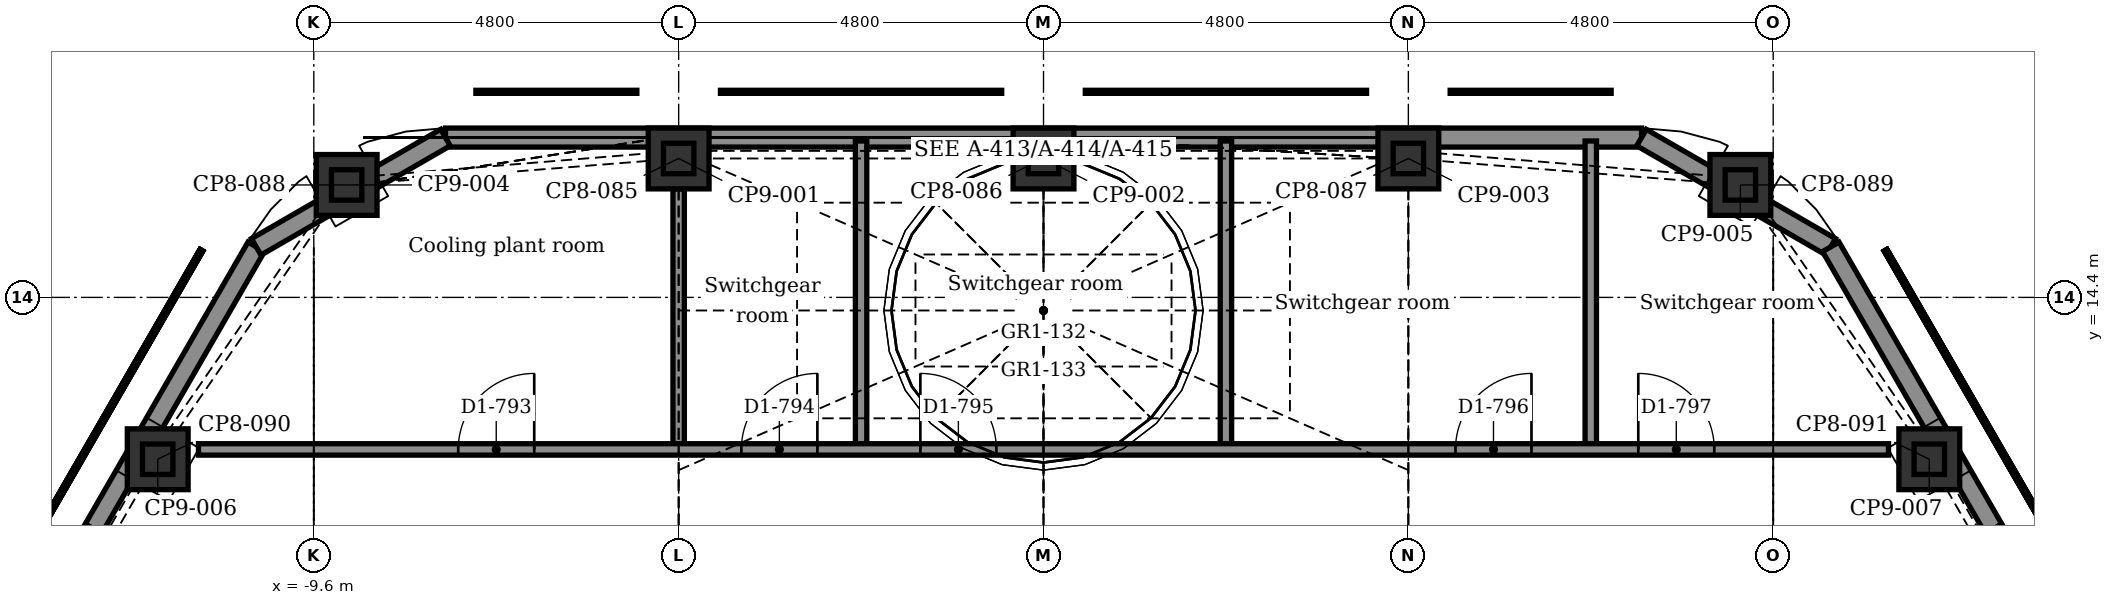
"""IFC4 building model, lengths in metres.
Left out: names, types, materials, properties, quantities, classifications, styles, units other than length and angle.
Written with IfcOpenShell. Run it as: python <this file> out.ifc"""

import sys

from ifc_helpers import new_model, si_unit, direction, frame, frame_2d, origin, origin_2d, place, context, subcontext, project, spatial, polyline, rectangle, hollow_rectangle, outline, extrude, element, fill, save


model = new_model("IFC4")
c1 = context("Model", 3, precision=1e-05, world=origin(), true_north=direction((0.0, 1.0)))
c2 = subcontext(c1, "Body", "Model", "MODEL_VIEW")
j1 = project(units=[si_unit("LENGTHUNIT", "METRE"), si_unit("PLANEANGLEUNIT", "RADIAN")], contexts=[c1])
p1 = place(None, origin())
s1 = spatial("IfcSite", under=j1, at=p1, CompositionType="ELEMENT")
p2 = place(p1, origin())
s2 = spatial("IfcBuilding", under=s1, at=p2, CompositionType="ELEMENT")
p3 = place(p2, frame((0.0, 0.0, 301.9)))
s3 = spatial("IfcBuildingStorey", under=s2, at=p3, CompositionType="ELEMENT", Elevation=301.9)
for number, where, z_axis, x_axis in (
    (1, (-9.168, 15.879, -0.3), (0.0, 0.0, 1.0), (0.866, 0.5, 0.0)),
    (2, (-4.8, 16.228, -0.3), (0.0, 0.0, 1.0), (1.0, 0.0, 0.0)),
    (3, (0.0, 16.228, -0.3), (0.0, 0.0, 1.0), (1.0, 0.0, 0.0)),
    (4, (4.8, 16.228, -0.3), (0.0, 0.0, 1.0), (1.0, 0.0, 0.0)),
    (5, (9.168, 15.879, -0.3), (0.0, 0.0, 1.0), (0.5, 0.866, 0.0)),
    (6, (11.654, 12.271, -0.3), (0.0, 0.0, 1.0), (0.866, 0.5, 0.0)),
    (7, (-11.654, 12.271, -0.3), (0.0, 0.0, 1.0), (0.5, 0.866, 0.0)),
):
    element("IfcColumn", number, at=place(p3, frame(where, z_axis=z_axis, x_axis=x_axis)), inside=s3, PredefinedType="COLUMN", context=c2, shape_type="SweptSolid", body=[
        extrude(rectangle(XDim=0.8, YDim=0.8, at=origin_2d()), origin(), (0.0, 0.0, 1.0), 5.3),
    ])
p4 = place(p3, frame((-9.168, 15.879, 5.0), z_axis=(0.0, 0.0, 1.0), x_axis=(1.0, 0.0, 0.0)))
e8 = element("IfcColumn", 8, at=p4, inside=s3, PredefinedType="COLUMN", context=c2, shape_type="SweptSolid", body=[
    extrude(hollow_rectangle(XDim=0.4, YDim=0.4, WallThickness=0.02, at=origin_2d()), origin(), (0.0, 0.0, 1.0), 19.768),
])
for number, where, z_axis, x_axis in (
    (9, (-4.8, 16.228, 5.0), (0.0, 0.0, 1.0), (1.0, 0.0, 0.0)),
    (10, (0.0, 16.228, 5.0), (0.0, 0.0, 1.0), (1.0, 0.0, 0.0)),
    (11, (4.8, 16.228, 5.0), (0.0, 0.0, 1.0), (1.0, 0.0, 0.0)),
):
    element("IfcColumn", number, at=place(p3, frame(where, z_axis=z_axis, x_axis=x_axis)), inside=s3, PredefinedType="COLUMN", context=c2, shape_type="SweptSolid", body=[
        extrude(hollow_rectangle(XDim=0.4, YDim=0.4, WallThickness=0.02, at=origin_2d()), origin(), (0.0, 0.0, 1.0), 19.986),
    ])
p5 = place(p3, frame((9.168, 15.879, 5.0), z_axis=(0.0, 0.0, 1.0), x_axis=(1.0, 0.0, 0.0)))
e12 = element("IfcColumn", 12, at=p5, inside=s3, PredefinedType="COLUMN", context=c2, shape_type="SweptSolid", body=[
    extrude(hollow_rectangle(XDim=0.4, YDim=0.4, WallThickness=0.02, at=origin_2d()), origin(), (0.0, 0.0, 1.0), 19.768),
])
for number, where, z_axis, x_axis in (
    (13, (11.654, 12.271, 5.0), (0.0, 0.0, 1.0), (1.0, 0.0, 0.0)),
    (14, (-11.654, 12.271, 5.0), (0.0, 0.0, 1.0), (1.0, 0.0, 0.0)),
):
    element("IfcColumn", number, at=place(p3, frame(where, z_axis=z_axis, x_axis=x_axis)), inside=s3, PredefinedType="COLUMN", context=c2, shape_type="SweptSolid", body=[
        extrude(hollow_rectangle(XDim=0.4, YDim=0.4, WallThickness=0.02, at=origin_2d()), origin(), (0.0, 0.0, 1.0), 17.513),
    ])
p6 = place(p3, frame((-7.868, 16.503, 0.0), z_axis=(0.0, 0.0, 1.0), x_axis=(1.0, 0.0, 0.0)))
e15 = element("IfcWall", 15, at=p6, inside=s3, PredefinedType="SOLIDWALL", context=c2, shape_type="SweptSolid", body=[
    extrude(rectangle(XDim=15.736, YDim=0.25, at=frame_2d((7.868, 0.0))), origin(), (0.0, 0.0, 1.0), 5.0),
])
p7 = place(p3, frame((7.868, 16.503, 0.0), z_axis=(0.0, 0.0, 1.0), x_axis=(0.866018712932, -0.500011588718, 0.0)))
e16 = element("IfcWall", 16, at=p7, inside=s3, PredefinedType="SOLIDWALL", context=c2, shape_type="SweptSolid", body=[
    extrude(outline(polyline([(0.0, 0.0), (2.875, 0.0), (2.875, 24.509), (0.0, 25.407), (0.0, 0.0)])), frame((0.0, 0.125, 0.0), z_axis=(0.0, -1.0, 0.0), x_axis=(1.0, 0.0, 0.0)), (0.0, 0.0, 1.0), 0.25),
])
p8 = place(p3, frame((10.358, 15.065, 0.0), z_axis=(0.0, 0.0, 1.0), x_axis=(0.500010301671, -0.86601945603, 0.0)))
e17 = element("IfcWall", 17, at=p8, inside=s3, PredefinedType="SOLIDWALL", context=c2, shape_type="SweptSolid", body=[
    extrude(outline(polyline([(0.0, 0.0), (15.736, 0.0), (15.736, 15.994), (0.0, 24.509), (0.0, 0.0)])), frame((0.0, 0.125, 0.0), z_axis=(0.0, -1.0, 0.0), x_axis=(1.0, 0.0, 0.0)), (0.0, 0.0, 1.0), 0.25),
])
p9 = place(p8, frame((4.268, 0.0, 5.8)))
e18 = element("IfcOpeningElement", 18, at=p9, cuts=e17, PredefinedType="OPENING", context=c2, shape_type="SweptSolid", body=[
    extrude(rectangle(XDim=2.4, YDim=3.6, at=frame_2d((1.2, 1.8))), frame((0.0, 0.135, 0.0), z_axis=(0.0, -1.0, 0.0), x_axis=(1.0, 0.0, 0.0)), (0.0, 0.0, 1.0), 0.27),
])
p10 = place(p8, frame((4.268, 0.0, 10.0)))
e19 = element("IfcOpeningElement", 19, at=p10, cuts=e17, PredefinedType="OPENING", context=c2, shape_type="SweptSolid", body=[
    extrude(rectangle(XDim=2.4, YDim=3.6, at=frame_2d((1.2, 1.8))), frame((0.0, 0.135, 0.0), z_axis=(0.0, -1.0, 0.0), x_axis=(1.0, 0.0, 0.0)), (0.0, 0.0, 1.0), 0.27),
])
p11 = place(p8, frame((4.268, 0.0, 14.2)))
e20 = element("IfcOpeningElement", 20, at=p11, cuts=e17, PredefinedType="OPENING", context=c2, shape_type="SweptSolid", body=[
    extrude(rectangle(XDim=2.4, YDim=3.6, at=frame_2d((1.2, 1.8))), frame((0.0, 0.135, 0.0), z_axis=(0.0, -1.0, 0.0), x_axis=(1.0, 0.0, 0.0)), (0.0, 0.0, 1.0), 0.27),
])
p12 = place(p8, frame((9.068, 0.0, 5.8)))
e21 = element("IfcOpeningElement", 21, at=p12, cuts=e17, PredefinedType="OPENING", context=c2, shape_type="SweptSolid", body=[
    extrude(rectangle(XDim=2.4, YDim=3.6, at=frame_2d((1.2, 1.8))), frame((0.0, 0.135, 0.0), z_axis=(0.0, -1.0, 0.0), x_axis=(1.0, 0.0, 0.0)), (0.0, 0.0, 1.0), 0.27),
])
p13 = place(p8, frame((9.068, 0.0, 10.0)))
e22 = element("IfcOpeningElement", 22, at=p13, cuts=e17, PredefinedType="OPENING", context=c2, shape_type="SweptSolid", body=[
    extrude(rectangle(XDim=2.4, YDim=3.6, at=frame_2d((1.2, 1.8))), frame((0.0, 0.135, 0.0), z_axis=(0.0, -1.0, 0.0), x_axis=(1.0, 0.0, 0.0)), (0.0, 0.0, 1.0), 0.27),
])
p14 = place(p8, frame((9.068, 0.0, 1.0)))
e23 = element("IfcOpeningElement", 23, at=p14, cuts=e17, PredefinedType="OPENING", context=c2, shape_type="SweptSolid", body=[
    extrude(rectangle(XDim=2.4, YDim=3.0, at=frame_2d((1.2, 1.5))), frame((0.0, 0.135, 0.0), z_axis=(0.0, -1.0, 0.0), x_axis=(1.0, 0.0, 0.0)), (0.0, 0.0, 1.0), 0.27),
])
p15 = place(p3, frame((-18.226, 1.438, 0.0), z_axis=(0.0, 0.0, 1.0), x_axis=(0.500010301671, 0.86601945603, 0.0)))
e24 = element("IfcWall", 24, at=p15, inside=s3, PredefinedType="SOLIDWALL", context=c2, shape_type="SweptSolid", body=[
    extrude(outline(polyline([(0.0, 0.0), (15.736, 0.0), (15.736, 24.509), (0.0, 15.994), (0.0, 0.0)])), frame((0.0, 0.125, 0.0), z_axis=(0.0, -1.0, 0.0), x_axis=(1.0, 0.0, 0.0)), (0.0, 0.0, 1.0), 0.25),
])
p16 = place(p15, frame((4.268, 0.0, 5.8)))
e25 = element("IfcOpeningElement", 25, at=p16, cuts=e24, PredefinedType="OPENING", context=c2, shape_type="SweptSolid", body=[
    extrude(rectangle(XDim=2.4, YDim=3.6, at=frame_2d((1.2, 1.8))), frame((0.0, 0.135, 0.0), z_axis=(0.0, -1.0, 0.0), x_axis=(1.0, 0.0, 0.0)), (0.0, 0.0, 1.0), 0.27),
])
p17 = place(p15, frame((4.268, 0.0, 10.0)))
e26 = element("IfcOpeningElement", 26, at=p17, cuts=e24, PredefinedType="OPENING", context=c2, shape_type="SweptSolid", body=[
    extrude(rectangle(XDim=2.4, YDim=3.6, at=frame_2d((1.2, 1.8))), frame((0.0, 0.135, 0.0), z_axis=(0.0, -1.0, 0.0), x_axis=(1.0, 0.0, 0.0)), (0.0, 0.0, 1.0), 0.27),
])
p18 = place(p15, frame((9.068, 0.0, 5.8)))
e27 = element("IfcOpeningElement", 27, at=p18, cuts=e24, PredefinedType="OPENING", context=c2, shape_type="SweptSolid", body=[
    extrude(rectangle(XDim=2.4, YDim=3.6, at=frame_2d((1.2, 1.8))), frame((0.0, 0.135, 0.0), z_axis=(0.0, -1.0, 0.0), x_axis=(1.0, 0.0, 0.0)), (0.0, 0.0, 1.0), 0.27),
])
p19 = place(p15, frame((9.068, 0.0, 10.0)))
e28 = element("IfcOpeningElement", 28, at=p19, cuts=e24, PredefinedType="OPENING", context=c2, shape_type="SweptSolid", body=[
    extrude(rectangle(XDim=2.4, YDim=3.6, at=frame_2d((1.2, 1.8))), frame((0.0, 0.135, 0.0), z_axis=(0.0, -1.0, 0.0), x_axis=(1.0, 0.0, 0.0)), (0.0, 0.0, 1.0), 0.27),
])
p20 = place(p15, frame((9.068, 0.0, 14.2)))
e29 = element("IfcOpeningElement", 29, at=p20, cuts=e24, PredefinedType="OPENING", context=c2, shape_type="SweptSolid", body=[
    extrude(rectangle(XDim=2.4, YDim=3.6, at=frame_2d((1.2, 1.8))), frame((0.0, 0.135, 0.0), z_axis=(0.0, -1.0, 0.0), x_axis=(1.0, 0.0, 0.0)), (0.0, 0.0, 1.0), 0.27),
])
p21 = place(p15, frame((4.268, 0.0, 1.0)))
e30 = element("IfcOpeningElement", 30, at=p21, cuts=e24, PredefinedType="OPENING", context=c2, shape_type="SweptSolid", body=[
    extrude(rectangle(XDim=2.4, YDim=3.0, at=frame_2d((1.2, 1.5))), frame((0.0, 0.135, 0.0), z_axis=(0.0, -1.0, 0.0), x_axis=(1.0, 0.0, 0.0)), (0.0, 0.0, 1.0), 0.27),
])
p22 = place(p3, frame((-10.358, 15.065, 0.0), z_axis=(0.0, 0.0, 1.0), x_axis=(0.866018712932, 0.500011588718, 0.0)))
e31 = element("IfcWall", 31, at=p22, inside=s3, PredefinedType="SOLIDWALL", context=c2, shape_type="SweptSolid", body=[
    extrude(outline(polyline([(0.0, 0.0), (2.875, 0.0), (2.875, 25.407), (0.0, 24.509), (0.0, 0.0)])), frame((0.0, 0.125, 0.0), z_axis=(0.0, -1.0, 0.0), x_axis=(1.0, 0.0, 0.0)), (0.0, 0.0, 1.0), 0.25),
])
for number, where, z_axis, x_axis in (
    (32, (7.2, 12.4, 0.0), (0.0, 0.0, 1.0), (0.0, 1.0, 0.0)),
    (33, (2.4, 12.4, 0.0), (0.0, 0.0, 1.0), (0.0, 1.0, 0.0)),
    (34, (-2.4, 12.4, 0.0), (0.0, 0.0, 1.0), (0.0, 1.0, 0.0)),
):
    element("IfcWall", number, at=place(p3, frame(where, z_axis=z_axis, x_axis=x_axis)), inside=s3, PredefinedType="PARTITIONING", context=c2, shape_type="SweptSolid", body=[
        extrude(rectangle(XDim=4.058, YDim=0.15, at=frame_2d((2.029, 0.0))), origin(), (0.0, 0.0, 1.0), 5.0),
    ])
p23 = place(p3, frame((-4.8, 12.4, 0.0), z_axis=(0.0, 0.0, 1.0), x_axis=(0.0, 1.0, 0.0)))
e35 = element("IfcWall", 35, at=p23, inside=s3, PredefinedType="PARTITIONING", context=c2, shape_type="SweptSolid", body=[
    extrude(rectangle(XDim=3.428, YDim=0.15, at=frame_2d((1.714, 0.0))), origin(), (0.0, 0.0, 1.0), 5.0),
])
p24 = place(p3, frame((-11.117, 12.4, 0.0), z_axis=(0.0, 0.0, 1.0), x_axis=(1.0, 0.0, 0.0)))
e36 = element("IfcWall", 36, at=p24, inside=s3, PredefinedType="PARTITIONING", context=c2, shape_type="SweptSolid", body=[
    extrude(rectangle(XDim=22.234, YDim=0.15, at=frame_2d((11.117, 0.0))), origin(), (0.0, 0.0, 1.0), 5.0),
])
p25 = place(p24, frame((3.417, 0.0, 0.0)))
e37 = element("IfcOpeningElement", 37, at=p25, cuts=e36, PredefinedType="OPENING", context=c2, shape_type="SweptSolid", body=[
    extrude(rectangle(XDim=1.0, YDim=2.1, at=frame_2d((0.5, 1.05))), frame((0.0, 0.085, 0.0), z_axis=(0.0, -1.0, 0.0), x_axis=(1.0, 0.0, 0.0)), (0.0, 0.0, 1.0), 0.17),
])
p26 = place(p24, frame((7.142, 0.0, 0.0)))
e38 = element("IfcOpeningElement", 38, at=p26, cuts=e36, PredefinedType="OPENING", context=c2, shape_type="SweptSolid", body=[
    extrude(rectangle(XDim=1.0, YDim=2.1, at=frame_2d((0.5, 1.05))), frame((0.0, 0.085, 0.0), z_axis=(0.0, -1.0, 0.0), x_axis=(1.0, 0.0, 0.0)), (0.0, 0.0, 1.0), 0.17),
])
p27 = place(p24, frame((9.497, 0.0, 0.0)))
e39 = element("IfcOpeningElement", 39, at=p27, cuts=e36, PredefinedType="OPENING", context=c2, shape_type="SweptSolid", body=[
    extrude(rectangle(XDim=1.0, YDim=2.1, at=frame_2d((0.5, 1.05))), frame((0.0, 0.085, 0.0), z_axis=(0.0, -1.0, 0.0), x_axis=(1.0, 0.0, 0.0)), (0.0, 0.0, 1.0), 0.17),
])
p28 = place(p24, frame((16.537, 0.0, 0.0)))
e40 = element("IfcOpeningElement", 40, at=p28, cuts=e36, PredefinedType="OPENING", context=c2, shape_type="SweptSolid", body=[
    extrude(rectangle(XDim=1.0, YDim=2.1, at=frame_2d((0.5, 1.05))), frame((0.0, 0.085, 0.0), z_axis=(0.0, -1.0, 0.0), x_axis=(1.0, 0.0, 0.0)), (0.0, 0.0, 1.0), 0.17),
])
p29 = place(p24, frame((18.942, 0.0, 0.0)))
e41 = element("IfcOpeningElement", 41, at=p29, cuts=e36, PredefinedType="OPENING", context=c2, shape_type="SweptSolid", body=[
    extrude(rectangle(XDim=1.0, YDim=2.1, at=frame_2d((0.5, 1.05))), frame((0.0, 0.085, 0.0), z_axis=(0.0, -1.0, 0.0), x_axis=(1.0, 0.0, 0.0)), (0.0, 0.0, 1.0), 0.17),
])
p30 = place(p25, origin())
e42 = element("IfcDoor", 42, at=p30, inside=s3, OperationType="SINGLE_SWING_RIGHT", PredefinedType="DOOR", context=c2, shape_type="SweptSolid", body=[
    extrude(rectangle(XDim=1.0, YDim=2.1, at=frame_2d((0.5, 1.05))), frame((0.0, 0.025, 0.0), z_axis=(0.0, -1.0, 0.0), x_axis=(1.0, 0.0, 0.0)), (0.0, 0.0, 1.0), 0.05),
])
fill(e37, e42)
p31 = place(p26, origin())
e43 = element("IfcDoor", 43, at=p31, inside=s3, OperationType="SINGLE_SWING_RIGHT", PredefinedType="DOOR", context=c2, shape_type="SweptSolid", body=[
    extrude(rectangle(XDim=1.0, YDim=2.1, at=frame_2d((0.5, 1.05))), frame((0.0, 0.025, 0.0), z_axis=(0.0, -1.0, 0.0), x_axis=(1.0, 0.0, 0.0)), (0.0, 0.0, 1.0), 0.05),
])
fill(e38, e43)
p32 = place(p27, origin())
e44 = element("IfcDoor", 44, at=p32, inside=s3, OperationType="SINGLE_SWING_LEFT", PredefinedType="DOOR", context=c2, shape_type="SweptSolid", body=[
    extrude(rectangle(XDim=1.0, YDim=2.1, at=frame_2d((0.5, 1.05))), frame((0.0, 0.025, 0.0), z_axis=(0.0, -1.0, 0.0), x_axis=(1.0, 0.0, 0.0)), (0.0, 0.0, 1.0), 0.05),
])
fill(e39, e44)
p33 = place(p28, origin())
e45 = element("IfcDoor", 45, at=p33, inside=s3, OperationType="SINGLE_SWING_RIGHT", PredefinedType="DOOR", context=c2, shape_type="SweptSolid", body=[
    extrude(rectangle(XDim=1.0, YDim=2.1, at=frame_2d((0.5, 1.05))), frame((0.0, 0.025, 0.0), z_axis=(0.0, -1.0, 0.0), x_axis=(1.0, 0.0, 0.0)), (0.0, 0.0, 1.0), 0.05),
])
fill(e40, e45)
p34 = place(p29, origin())
e46 = element("IfcDoor", 46, at=p34, inside=s3, OperationType="SINGLE_SWING_LEFT", PredefinedType="DOOR", context=c2, shape_type="SweptSolid", body=[
    extrude(rectangle(XDim=1.0, YDim=2.1, at=frame_2d((0.5, 1.05))), frame((0.0, 0.025, 0.0), z_axis=(0.0, -1.0, 0.0), x_axis=(1.0, 0.0, 0.0)), (0.0, 0.0, 1.0), 0.05),
])
fill(e41, e46)
save(model, sys.argv[1])
